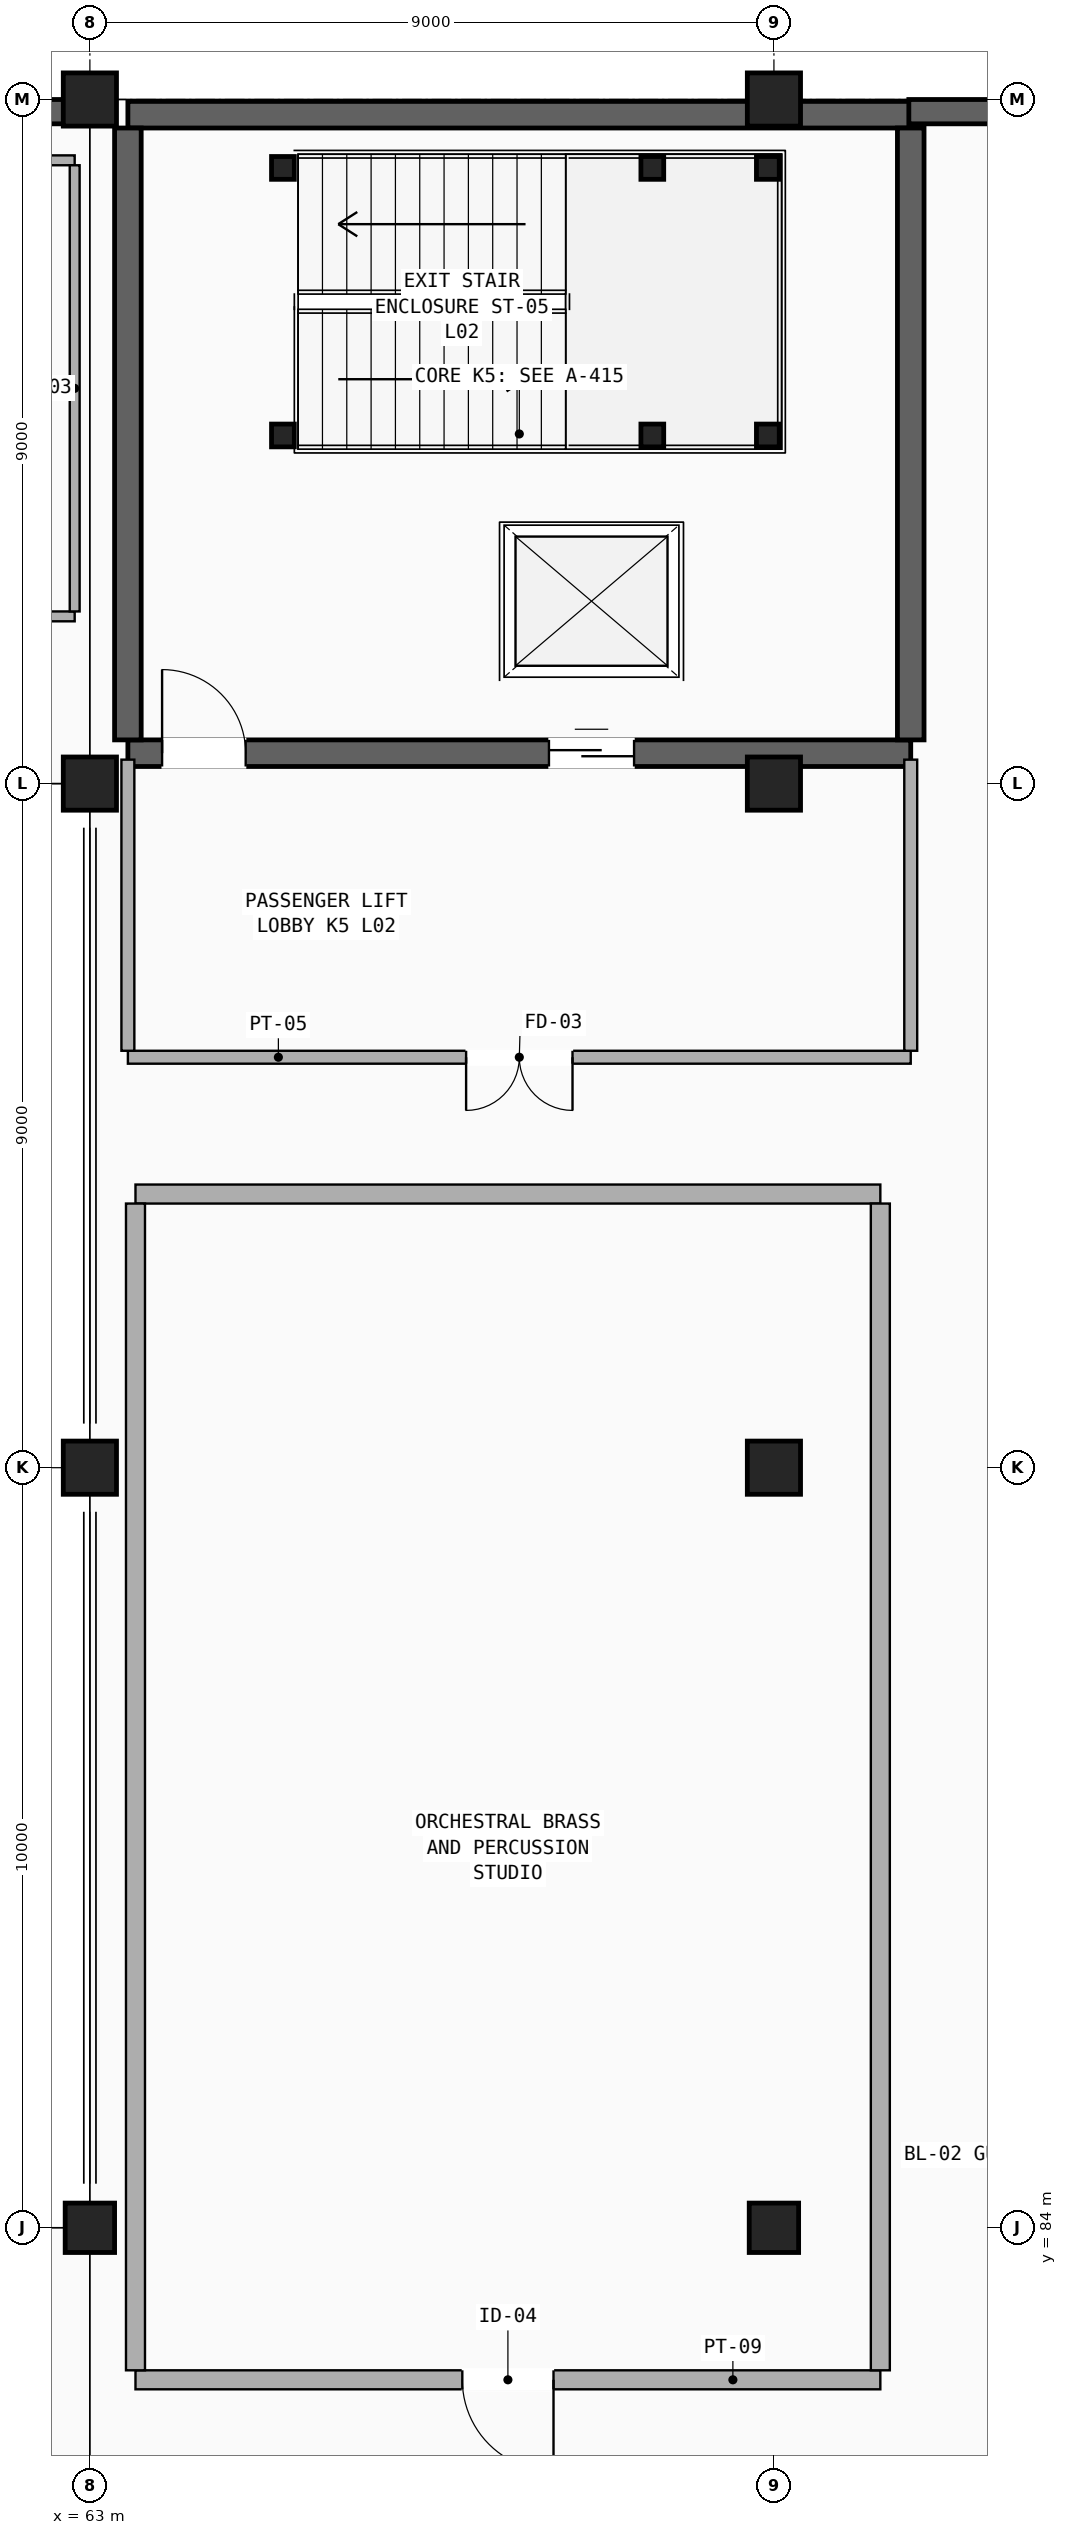
"""IFC4 building model, lengths in metres.
Left out: names, types, materials, properties, quantities, classifications, styles, units other than length and angle.
Written with IfcOpenShell. Run it as: python <this file> out.ifc"""

import sys

from ifc_helpers import new_model, si_unit, direction, frame, frame_2d, origin, origin_2d, place, context, subcontext, project, spatial, rectangle, hollow_rectangle, extrude, element, fill, save


model = new_model("IFC4")
c1 = context("Model", 3, precision=1e-05, world=origin(), true_north=direction((0.0, 1.0)))
c2 = subcontext(c1, "Body", "Model", "MODEL_VIEW")
j1 = project(units=[si_unit("LENGTHUNIT", "METRE"), si_unit("PLANEANGLEUNIT", "RADIAN")], contexts=[c1])
p1 = place(None, origin())
s1 = spatial("IfcSite", under=j1, at=p1, CompositionType="ELEMENT")
p2 = place(p1, origin())
s2 = spatial("IfcBuilding", under=s1, at=p2, CompositionType="ELEMENT")
p3 = place(p2, frame((0.0, 0.0, 9.52)))
s3 = spatial("IfcBuildingStorey", under=s2, at=p3, CompositionType="ELEMENT", Elevation=9.52)
p4 = place(p3, frame((63.0, 84.0, 0.0), z_axis=(0.0, 0.0, 1.0), x_axis=(1.0, 0.0, 0.0)))
e1 = element("IfcColumn", 1, at=p4, inside=s3, PredefinedType="COLUMN", context=c2, shape_type="SweptSolid", body=[
    extrude(rectangle(XDim=0.65, YDim=0.65, at=origin_2d()), origin(), (0.0, 0.0, 1.0), 4.08),
])
for number, where, z_axis, x_axis in (
    (2, (63.0, 94.0, 0.0), (0.0, 0.0, 1.0), (1.0, 0.0, 0.0)),
    (3, (63.0, 103.0, 0.0), (0.0, 0.0, 1.0), (1.0, 0.0, 0.0)),
    (4, (63.0, 112.0, 0.0), (0.0, 0.0, 1.0), (1.0, 0.0, 0.0)),
):
    element("IfcColumn", number, at=place(p3, frame(where, z_axis=z_axis, x_axis=x_axis)), inside=s3, PredefinedType="COLUMN", context=c2, shape_type="SweptSolid", body=[
        extrude(rectangle(XDim=0.7, YDim=0.7, at=origin_2d()), origin(), (0.0, 0.0, 1.0), 4.08),
    ])
p5 = place(p3, frame((72.0, 84.0, 0.0), z_axis=(0.0, 0.0, 1.0), x_axis=(1.0, 0.0, 0.0)))
e5 = element("IfcColumn", 5, at=p5, inside=s3, PredefinedType="COLUMN", context=c2, shape_type="SweptSolid", body=[
    extrude(rectangle(XDim=0.65, YDim=0.65, at=origin_2d()), origin(), (0.0, 0.0, 1.0), 4.08),
])
for number, where, z_axis, x_axis in (
    (6, (72.0, 94.0, 0.0), (0.0, 0.0, 1.0), (1.0, 0.0, 0.0)),
    (7, (72.0, 103.0, 0.0), (0.0, 0.0, 1.0), (1.0, 0.0, 0.0)),
    (8, (72.0, 112.0, 0.0), (0.0, 0.0, 1.0), (1.0, 0.0, 0.0)),
):
    element("IfcColumn", number, at=place(p3, frame(where, z_axis=z_axis, x_axis=x_axis)), inside=s3, PredefinedType="COLUMN", context=c2, shape_type="SweptSolid", body=[
        extrude(rectangle(XDim=0.7, YDim=0.7, at=origin_2d()), origin(), (0.0, 0.0, 1.0), 4.08),
    ])
p6 = place(p3, frame((63.5, 103.4, 0.0), z_axis=(0.0, 0.0, 1.0), x_axis=(1.0, 0.0, 0.0)))
e9 = element("IfcWall", 9, at=p6, inside=s3, PredefinedType="SHEAR", context=c2, shape_type="SweptSolid", body=[
    extrude(rectangle(XDim=10.3, YDim=0.35, at=frame_2d((5.15, 0.0))), origin(), (0.0, 0.0, 1.0), 4.08),
])
p7 = place(p6, frame((0.45, 0.0, 0.0)))
e10 = element("IfcOpeningElement", 10, at=p7, cuts=e9, PredefinedType="OPENING", context=c2, shape_type="SweptSolid", body=[
    extrude(rectangle(XDim=1.1, YDim=2.2, at=frame_2d((0.55, 1.1))), frame((0.0, 0.185, 0.0), z_axis=(0.0, -1.0, 0.0), x_axis=(1.0, 0.0, 0.0)), (0.0, 0.0, 1.0), 0.37),
])
p8 = place(p6, frame((5.54, 0.0, 0.0)))
e11 = element("IfcOpeningElement", 11, at=p8, cuts=e9, PredefinedType="OPENING", context=c2, shape_type="SweptSolid", body=[
    extrude(rectangle(XDim=1.12, YDim=2.16, at=frame_2d((0.56, 1.08))), frame((0.0, 0.185, 0.0), z_axis=(0.0, -1.0, 0.0), x_axis=(1.0, 0.0, 0.0)), (0.0, 0.0, 1.0), 0.37),
])
p9 = place(p3, frame((63.5, 111.8, 0.0), z_axis=(0.0, 0.0, 1.0), x_axis=(1.0, 0.0, 0.0)))
e12 = element("IfcWall", 12, at=p9, inside=s3, PredefinedType="SHEAR", context=c2, shape_type="SweptSolid", body=[
    extrude(rectangle(XDim=10.3, YDim=0.35, at=frame_2d((5.15, 0.0))), origin(), (0.0, 0.0, 1.0), 4.08),
])
for number, where, z_axis, x_axis in (
    (13, (63.5, 103.575, 0.0), (0.0, 0.0, 1.0), (0.0, 1.0, 0.0)),
    (14, (73.8, 103.575, 0.0), (0.0, 0.0, 1.0), (0.0, 1.0, 0.0)),
):
    element("IfcWall", number, at=place(p3, frame(where, z_axis=z_axis, x_axis=x_axis)), inside=s3, PredefinedType="SHEAR", context=c2, shape_type="SweptSolid", body=[
        extrude(rectangle(XDim=8.05, YDim=0.35, at=frame_2d((4.025, 0.0))), origin(), (0.0, 0.0, 1.0), 4.08),
    ])
p10 = place(p3, frame((18.35, 111.84, 0.0), z_axis=(0.0, 0.0, 1.0), x_axis=(1.0, 0.0, 0.0)))
e15 = element("IfcWall", 15, at=p10, inside=s3, PredefinedType="SHEAR", context=c2, shape_type="SweptSolid", body=[
    extrude(rectangle(XDim=44.95, YDim=0.32, at=frame_2d((22.475, 0.0))), origin(), (0.0, 0.0, 1.0), 4.08),
])
p11 = place(p3, frame((73.775, 111.84, 0.0), z_axis=(0.0, 0.0, 1.0), x_axis=(1.0, 0.0, 0.0)))
e16 = element("IfcWall", 16, at=p11, inside=s3, PredefinedType="SHEAR", context=c2, shape_type="SweptSolid", body=[
    extrude(rectangle(XDim=79.875, YDim=0.32, at=frame_2d((39.938, 0.0))), origin(), (0.0, 0.0, 1.0), 4.08),
])
for number, where, z_axis, x_axis in (
    (17, (65.54, 107.58, 0.0), (0.0, 0.0, 1.0), (1.0, 0.0, 0.0)),
    (18, (65.54, 111.1, 0.0), (0.0, 0.0, 1.0), (1.0, 0.0, 0.0)),
    (19, (70.4, 107.58, 0.0), (0.0, 0.0, 1.0), (1.0, 0.0, 0.0)),
    (20, (70.4, 111.1, 0.0), (0.0, 0.0, 1.0), (1.0, 0.0, 0.0)),
    (21, (71.92, 107.58, 0.0), (0.0, 0.0, 1.0), (1.0, 0.0, 0.0)),
    (22, (71.92, 111.1, 0.0), (0.0, 0.0, 1.0), (1.0, 0.0, 0.0)),
):
    element("IfcColumn", number, at=place(p3, frame(where, z_axis=z_axis, x_axis=x_axis)), inside=s3, PredefinedType="COLUMN", context=c2, shape_type="SweptSolid", body=[
        extrude(hollow_rectangle(XDim=0.3, YDim=0.3, WallThickness=0.016, InnerFilletRadius=0.016, OuterFilletRadius=0.032, at=origin_2d()), origin(), (0.0, 0.0, 1.0), 4.08),
    ])
p12 = place(p3, frame((63.5, 99.4, 0.0), z_axis=(0.0, 0.0, 1.0), x_axis=(1.0, 0.0, 0.0)))
e23 = element("IfcWall", 23, at=p12, inside=s3, PredefinedType="PARTITIONING", context=c2, shape_type="SweptSolid", body=[
    extrude(rectangle(XDim=10.3, YDim=0.17, at=frame_2d((5.15, 0.0))), origin(), (0.0, 0.0, 1.0), 3.17),
])
p13 = place(p12, frame((4.45, 0.0, 0.0)))
e24 = element("IfcOpeningElement", 24, at=p13, cuts=e23, PredefinedType="OPENING", context=c2, shape_type="SweptSolid", body=[
    extrude(rectangle(XDim=1.4, YDim=2.2, at=frame_2d((0.7, 1.1))), frame((0.0, 0.095, 0.0), z_axis=(0.0, -1.0, 0.0), x_axis=(1.0, 0.0, 0.0)), (0.0, 0.0, 1.0), 0.19),
])
p14 = place(p3, frame((63.5, 99.485, 0.0), z_axis=(0.0, 0.0, 1.0), x_axis=(0.0, 1.0, 0.0)))
e25 = element("IfcWall", 25, at=p14, inside=s3, PredefinedType="PARTITIONING", context=c2, shape_type="SweptSolid", body=[
    extrude(rectangle(XDim=3.83, YDim=0.17, at=frame_2d((1.915, 0.0))), origin(), (0.0, 0.0, 1.0), 2.82),
])
p15 = place(p3, frame((73.8, 99.485, 0.0), z_axis=(0.0, 0.0, 1.0), x_axis=(0.0, 1.0, 0.0)))
e26 = element("IfcWall", 26, at=p15, inside=s3, PredefinedType="PARTITIONING", context=c2, shape_type="SweptSolid", body=[
    extrude(rectangle(XDim=3.83, YDim=0.17, at=frame_2d((1.915, 0.0))), origin(), (0.0, 0.0, 1.0), 2.92),
])
p16 = place(p3, frame((36.6, 105.2, 0.0), z_axis=(0.0, 0.0, 1.0), x_axis=(1.0, 0.0, 0.0)))
e27 = element("IfcWall", 27, at=p16, inside=s3, PredefinedType="PARTITIONING", context=c2, shape_type="SweptSolid", body=[
    extrude(rectangle(XDim=26.2, YDim=0.13, at=frame_2d((13.1, 0.0))), origin(), (0.0, 0.0, 1.0), 2.97),
])
p17 = place(p16, frame((12.3, 0.0, 0.0)))
e28 = element("IfcOpeningElement", 28, at=p17, cuts=e27, PredefinedType="OPENING", context=c2, shape_type="SweptSolid", body=[
    extrude(rectangle(XDim=1.6, YDim=2.25, at=frame_2d((0.8, 1.125))), frame((0.0, 0.075, 0.0), z_axis=(0.0, -1.0, 0.0), x_axis=(1.0, 0.0, 0.0)), (0.0, 0.0, 1.0), 0.15),
])
p18 = place(p3, frame((36.6, 111.2, 0.0), z_axis=(0.0, 0.0, 1.0), x_axis=(1.0, 0.0, 0.0)))
e29 = element("IfcWall", 29, at=p18, inside=s3, PredefinedType="PARTITIONING", context=c2, shape_type="SweptSolid", body=[
    extrude(rectangle(XDim=26.2, YDim=0.13, at=frame_2d((13.1, 0.0))), origin(), (0.0, 0.0, 1.0), 2.97),
])
p19 = place(p3, frame((62.8, 105.265, 0.0), z_axis=(0.0, 0.0, 1.0), x_axis=(0.0, 1.0, 0.0)))
e30 = element("IfcWall", 30, at=p19, inside=s3, PredefinedType="PARTITIONING", context=c2, shape_type="SweptSolid", body=[
    extrude(rectangle(XDim=5.87, YDim=0.13, at=frame_2d((2.935, 0.0))), origin(), (0.0, 0.0, 1.0), 3.12),
])
p20 = place(p3, frame((63.6, 82.0, 0.0), z_axis=(0.0, 0.0, 1.0), x_axis=(1.0, 0.0, 0.0)))
e31 = element("IfcWall", 31, at=p20, inside=s3, PredefinedType="PARTITIONING", context=c2, shape_type="SweptSolid", body=[
    extrude(rectangle(XDim=9.8, YDim=0.25, at=frame_2d((4.9, 0.0))), origin(), (0.0, 0.0, 1.0), 3.12),
])
p21 = place(p20, frame((4.3, 0.0, 0.0)))
e32 = element("IfcOpeningElement", 32, at=p21, cuts=e31, PredefinedType="OPENING", context=c2, shape_type="SweptSolid", body=[
    extrude(rectangle(XDim=1.2, YDim=2.2, at=frame_2d((0.6, 1.1))), frame((0.0, 0.135, 0.0), z_axis=(0.0, -1.0, 0.0), x_axis=(1.0, 0.0, 0.0)), (0.0, 0.0, 1.0), 0.27),
])
p22 = place(p3, frame((63.6, 97.6, 0.0), z_axis=(0.0, 0.0, 1.0), x_axis=(1.0, 0.0, 0.0)))
e33 = element("IfcWall", 33, at=p22, inside=s3, PredefinedType="PARTITIONING", context=c2, shape_type="SweptSolid", body=[
    extrude(rectangle(XDim=9.8, YDim=0.25, at=frame_2d((4.9, 0.0))), origin(), (0.0, 0.0, 1.0), 3.17),
])
p23 = place(p3, frame((63.6, 82.125, 0.0), z_axis=(0.0, 0.0, 1.0), x_axis=(0.0, 1.0, 0.0)))
e34 = element("IfcWall", 34, at=p23, inside=s3, PredefinedType="PARTITIONING", context=c2, shape_type="SweptSolid", body=[
    extrude(rectangle(XDim=15.35, YDim=0.25, at=frame_2d((7.675, 0.0))), origin(), (0.0, 0.0, 1.0), 2.92),
])
p24 = place(p3, frame((73.4, 82.125, 0.0), z_axis=(0.0, 0.0, 1.0), x_axis=(0.0, 1.0, 0.0)))
e35 = element("IfcWall", 35, at=p24, inside=s3, PredefinedType="PARTITIONING", context=c2, shape_type="SweptSolid", body=[
    extrude(rectangle(XDim=15.35, YDim=0.25, at=frame_2d((7.675, 0.0))), origin(), (0.0, 0.0, 1.0), 2.82),
])
p25 = place(p7, origin())
e36 = element("IfcDoor", 36, at=p25, inside=s3, OperationType="SINGLE_SWING_LEFT", PredefinedType="DOOR", context=c2, shape_type="SweptSolid", body=[
    extrude(rectangle(XDim=1.1, YDim=2.2, at=frame_2d((0.55, 1.1))), frame((0.0, 0.025, 0.0), z_axis=(0.0, -1.0, 0.0), x_axis=(1.0, 0.0, 0.0)), (0.0, 0.0, 1.0), 0.05),
])
fill(e10, e36)
p26 = place(p8, origin())
e37 = element("IfcDoor", 37, at=p26, inside=s3, OperationType="SLIDING_TO_LEFT", PredefinedType="DOOR", context=c2, shape_type="SweptSolid", body=[
    extrude(rectangle(XDim=1.12, YDim=2.16, at=frame_2d((0.56, 1.08))), frame((0.0, 0.025, 0.0), z_axis=(0.0, -1.0, 0.0), x_axis=(1.0, 0.0, 0.0)), (0.0, 0.0, 1.0), 0.05),
])
fill(e11, e37)
p27 = place(p13, frame((1.4, 0.0, 0.0), z_axis=(0.0, 0.0, 1.0), x_axis=(-1.0, 0.0, 0.0)))
e38 = element("IfcDoor", 38, at=p27, inside=s3, OperationType="DOUBLE_DOOR_SINGLE_SWING", PredefinedType="DOOR", context=c2, shape_type="SweptSolid", body=[
    extrude(rectangle(XDim=1.4, YDim=2.2, at=frame_2d((0.7, 1.1))), frame((0.0, 0.025, 0.0), z_axis=(0.0, -1.0, 0.0), x_axis=(1.0, 0.0, 0.0)), (0.0, 0.0, 1.0), 0.05),
])
fill(e24, e38)
p28 = place(p21, frame((1.2, 0.0, 0.0), z_axis=(0.0, 0.0, 1.0), x_axis=(-1.0, 0.0, 0.0)))
e39 = element("IfcDoor", 39, at=p28, inside=s3, OperationType="SINGLE_SWING_LEFT", PredefinedType="DOOR", context=c2, shape_type="SweptSolid", body=[
    extrude(rectangle(XDim=1.2, YDim=2.2, at=frame_2d((0.6, 1.1))), frame((0.0, 0.025, 0.0), z_axis=(0.0, -1.0, 0.0), x_axis=(1.0, 0.0, 0.0)), (0.0, 0.0, 1.0), 0.05),
])
fill(e32, e39)
save(model, sys.argv[1])
